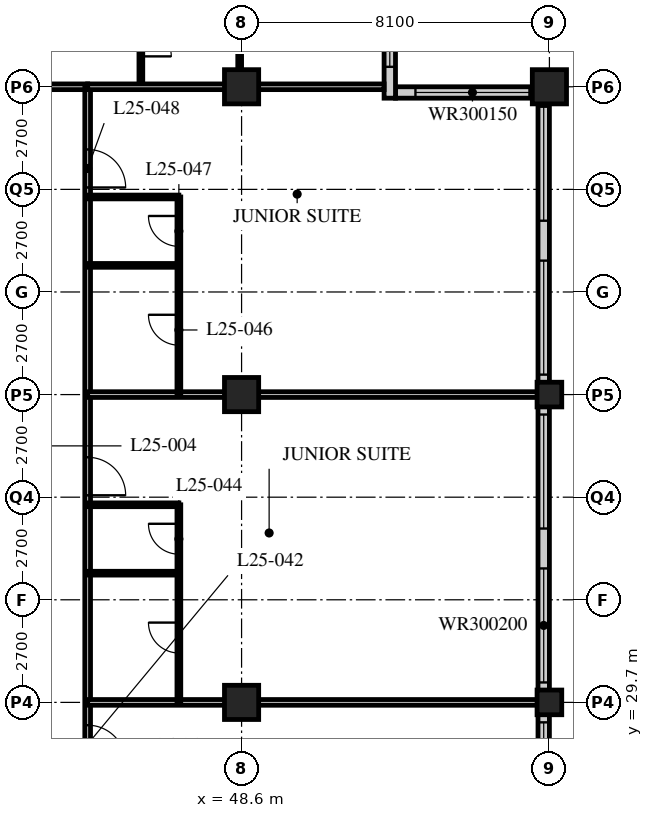
"""IFC4 building model, lengths in metres.
Left out: names, types, materials, properties, quantities, classifications, styles, units other than length and angle.
Written with IfcOpenShell. Run it as: python <this file> out.ifc"""

import sys

from ifc_helpers import new_model, si_unit, direction, frame, frame_2d, origin, origin_2d, place, context, subcontext, project, spatial, rectangle, hollow_rectangle, extrude, element, fill, save


model = new_model("IFC4")
c1 = context("Model", 3, precision=1e-05, world=origin(), true_north=direction((0.0, 1.0)))
c2 = subcontext(c1, "Body", "Model", "MODEL_VIEW")
j1 = project(units=[si_unit("LENGTHUNIT", "METRE"), si_unit("PLANEANGLEUNIT", "RADIAN")], contexts=[c1])
p1 = place(None, origin())
s1 = spatial("IfcSite", under=j1, at=p1, CompositionType="ELEMENT")
p2 = place(p1, origin())
s2 = spatial("IfcBuilding", under=s1, at=p2, CompositionType="ELEMENT")
p3 = place(p2, frame((0.0, 0.0, 103.4)))
s3 = spatial("IfcBuildingStorey", under=s2, at=p3, CompositionType="ELEMENT", Elevation=103.4)
for number, where, z_axis, x_axis in (
    (1, (48.6, 29.7, 0.0), (0.0, 0.0, 1.0), (1.0, 0.0, 0.0)),
    (2, (48.6, 37.8, 0.0), (0.0, 0.0, 1.0), (1.0, 0.0, 0.0)),
    (3, (48.6, 45.9, 0.0), (0.0, 0.0, 1.0), (1.0, 0.0, 0.0)),
):
    element("IfcColumn", number, at=place(p3, frame(where, z_axis=z_axis, x_axis=x_axis)), inside=s3, PredefinedType="COLUMN", context=c2, shape_type="SweptSolid", body=[
        extrude(hollow_rectangle(XDim=0.9, YDim=0.9, WallThickness=0.1, at=origin_2d()), origin(), (0.0, 0.0, 1.0), 3.4),
    ])
for number, where, z_axis, x_axis in (
    (4, (56.7, 29.7, 0.0), (0.0, 0.0, 1.0), (1.0, 0.0, 0.0)),
    (5, (56.7, 37.8, 0.0), (0.0, 0.0, 1.0), (1.0, 0.0, 0.0)),
):
    element("IfcColumn", number, at=place(p3, frame(where, z_axis=z_axis, x_axis=x_axis)), inside=s3, PredefinedType="COLUMN", context=c2, shape_type="SweptSolid", body=[
        extrude(hollow_rectangle(XDim=0.65, YDim=0.65, WallThickness=0.055, at=origin_2d()), origin(), (0.0, 0.0, 1.0), 3.4),
    ])
p4 = place(p3, frame((56.7, 45.9, 0.0), z_axis=(0.0, 0.0, 1.0), x_axis=(1.0, 0.0, 0.0)))
e6 = element("IfcColumn", 6, at=p4, inside=s3, PredefinedType="COLUMN", context=c2, shape_type="SweptSolid", body=[
    extrude(hollow_rectangle(XDim=0.9, YDim=0.9, WallThickness=0.09, at=origin_2d()), origin(), (0.0, 0.0, 1.0), 3.4),
])
p5 = place(p3, frame((56.55, 13.8, 0.0), z_axis=(0.0, 0.0, 1.0), x_axis=(0.0, 1.0, 0.0)))
e7 = element("IfcWall", 7, at=p5, inside=s3, PredefinedType="SOLIDWALL", context=c2, shape_type="SweptSolid", body=[
    extrude(rectangle(XDim=32.1, YDim=0.3, at=frame_2d((16.05, 0.0))), origin(), (0.0, 0.0, 1.0), 3.19),
])
p6 = place(p5, frame((0.225, 0.0, 0.9)))
e8 = element("IfcOpeningElement", 8, at=p6, cuts=e7, PredefinedType="OPENING", context=c2, shape_type="SweptSolid", body=[
    extrude(rectangle(XDim=3.0, YDim=2.0, at=frame_2d((1.5, 1.0))), frame((0.0, 0.16, 0.0), z_axis=(0.0, -1.0, 0.0), x_axis=(1.0, 0.0, 0.0)), (0.0, 0.0, 1.0), 0.32),
])
p7 = place(p5, frame((4.275, 0.0, 0.9)))
e9 = element("IfcOpeningElement", 9, at=p7, cuts=e7, PredefinedType="OPENING", context=c2, shape_type="SweptSolid", body=[
    extrude(rectangle(XDim=3.0, YDim=2.0, at=frame_2d((1.5, 1.0))), frame((0.0, 0.16, 0.0), z_axis=(0.0, -1.0, 0.0), x_axis=(1.0, 0.0, 0.0)), (0.0, 0.0, 1.0), 0.32),
])
p8 = place(p5, frame((8.325, 0.0, 0.9)))
e10 = element("IfcOpeningElement", 10, at=p8, cuts=e7, PredefinedType="OPENING", context=c2, shape_type="SweptSolid", body=[
    extrude(rectangle(XDim=3.0, YDim=2.0, at=frame_2d((1.5, 1.0))), frame((0.0, 0.16, 0.0), z_axis=(0.0, -1.0, 0.0), x_axis=(1.0, 0.0, 0.0)), (0.0, 0.0, 1.0), 0.32),
])
p9 = place(p5, frame((12.375, 0.0, 0.9)))
e11 = element("IfcOpeningElement", 11, at=p9, cuts=e7, PredefinedType="OPENING", context=c2, shape_type="SweptSolid", body=[
    extrude(rectangle(XDim=3.0, YDim=2.0, at=frame_2d((1.5, 1.0))), frame((0.0, 0.16, 0.0), z_axis=(0.0, -1.0, 0.0), x_axis=(1.0, 0.0, 0.0)), (0.0, 0.0, 1.0), 0.32),
])
p10 = place(p5, frame((16.425, 0.0, 0.9)))
e12 = element("IfcOpeningElement", 12, at=p10, cuts=e7, PredefinedType="OPENING", context=c2, shape_type="SweptSolid", body=[
    extrude(rectangle(XDim=3.0, YDim=2.0, at=frame_2d((1.5, 1.0))), frame((0.0, 0.16, 0.0), z_axis=(0.0, -1.0, 0.0), x_axis=(1.0, 0.0, 0.0)), (0.0, 0.0, 1.0), 0.32),
])
p11 = place(p5, frame((20.475, 0.0, 0.9)))
e13 = element("IfcOpeningElement", 13, at=p11, cuts=e7, PredefinedType="OPENING", context=c2, shape_type="SweptSolid", body=[
    extrude(rectangle(XDim=3.0, YDim=2.0, at=frame_2d((1.5, 1.0))), frame((0.0, 0.16, 0.0), z_axis=(0.0, -1.0, 0.0), x_axis=(1.0, 0.0, 0.0)), (0.0, 0.0, 1.0), 0.32),
])
p12 = place(p5, frame((24.525, 0.0, 0.9)))
e14 = element("IfcOpeningElement", 14, at=p12, cuts=e7, PredefinedType="OPENING", context=c2, shape_type="SweptSolid", body=[
    extrude(rectangle(XDim=3.0, YDim=2.0, at=frame_2d((1.5, 1.0))), frame((0.0, 0.16, 0.0), z_axis=(0.0, -1.0, 0.0), x_axis=(1.0, 0.0, 0.0)), (0.0, 0.0, 1.0), 0.32),
])
p13 = place(p5, frame((28.575, 0.0, 0.9)))
e15 = element("IfcOpeningElement", 15, at=p13, cuts=e7, PredefinedType="OPENING", context=c2, shape_type="SweptSolid", body=[
    extrude(rectangle(XDim=3.0, YDim=2.0, at=frame_2d((1.5, 1.0))), frame((0.0, 0.16, 0.0), z_axis=(0.0, -1.0, 0.0), x_axis=(1.0, 0.0, 0.0)), (0.0, 0.0, 1.0), 0.32),
])
p14 = place(p3, frame((56.4, 45.75, 0.0), z_axis=(0.0, 0.0, 1.0), x_axis=(-1.0, 0.0, 0.0)))
e16 = element("IfcWall", 16, at=p14, inside=s3, PredefinedType="SOLIDWALL", context=c2, shape_type="SweptSolid", body=[
    extrude(rectangle(XDim=3.75, YDim=0.3, at=frame_2d((1.875, 0.0))), origin(), (0.0, 0.0, 1.0), 3.19),
])
p15 = place(p14, frame((0.225, 0.0, 0.9)))
e17 = element("IfcOpeningElement", 17, at=p15, cuts=e16, PredefinedType="OPENING", context=c2, shape_type="SweptSolid", body=[
    extrude(rectangle(XDim=3.0, YDim=1.5, at=frame_2d((1.5, 0.75))), frame((0.0, 0.16, 0.0), z_axis=(0.0, -1.0, 0.0), x_axis=(1.0, 0.0, 0.0)), (0.0, 0.0, 1.0), 0.32),
])
p16 = place(p3, frame((52.5, 45.6, 0.0), z_axis=(0.0, 0.0, 1.0), x_axis=(0.0, 1.0, 0.0)))
e18 = element("IfcWall", 18, at=p16, inside=s3, PredefinedType="SOLIDWALL", context=c2, shape_type="SweptSolid", body=[
    extrude(rectangle(XDim=4.35, YDim=0.3, at=frame_2d((2.175, 0.0))), origin(), (0.0, 0.0, 1.0), 3.19),
])
p17 = place(p16, frame((0.825, 0.0, 0.9)))
e19 = element("IfcOpeningElement", 19, at=p17, cuts=e18, PredefinedType="OPENING", context=c2, shape_type="SweptSolid", body=[
    extrude(rectangle(XDim=3.0, YDim=1.5, at=frame_2d((1.5, 0.75))), frame((0.0, 0.16, 0.0), z_axis=(0.0, -1.0, 0.0), x_axis=(1.0, 0.0, 0.0)), (0.0, 0.0, 1.0), 0.32),
])
p18 = place(p3, frame((12.15, 45.9, 0.0), z_axis=(0.0, 0.0, 1.0), x_axis=(1.0, 0.0, 0.0)))
e20 = element("IfcWall", 20, at=p18, inside=s3, PredefinedType="PARTITIONING", context=c2, shape_type="SweptSolid", body=[
    extrude(rectangle(XDim=32.4, YDim=0.15, at=frame_2d((16.2, 0.0))), origin(), (0.0, 0.0, 1.0), 2.578),
])
p19 = place(p18, frame((9.5, 0.0, 0.0)))
e21 = element("IfcOpeningElement", 21, at=p19, cuts=e20, PredefinedType="OPENING", context=c2, shape_type="SweptSolid", body=[
    extrude(rectangle(XDim=1.0, YDim=2.1, at=frame_2d((0.5, 1.05))), frame((0.0, 0.085, 0.0), z_axis=(0.0, -1.0, 0.0), x_axis=(1.0, 0.0, 0.0)), (0.0, 0.0, 1.0), 0.17),
])
p20 = place(p18, frame((17.6, 0.0, 0.0)))
e22 = element("IfcOpeningElement", 22, at=p20, cuts=e20, PredefinedType="OPENING", context=c2, shape_type="SweptSolid", body=[
    extrude(rectangle(XDim=1.0, YDim=2.1, at=frame_2d((0.5, 1.05))), frame((0.0, 0.085, 0.0), z_axis=(0.0, -1.0, 0.0), x_axis=(1.0, 0.0, 0.0)), (0.0, 0.0, 1.0), 0.17),
])
p21 = place(p18, frame((25.7, 0.0, 0.0)))
e23 = element("IfcOpeningElement", 23, at=p21, cuts=e20, PredefinedType="OPENING", context=c2, shape_type="SweptSolid", body=[
    extrude(rectangle(XDim=1.0, YDim=2.1, at=frame_2d((0.5, 1.05))), frame((0.0, 0.085, 0.0), z_axis=(0.0, -1.0, 0.0), x_axis=(1.0, 0.0, 0.0)), (0.0, 0.0, 1.0), 0.17),
])
p22 = place(p18, frame((29.875, 0.0, 0.0)))
e24 = element("IfcOpeningElement", 24, at=p22, cuts=e20, PredefinedType="OPENING", context=c2, shape_type="SweptSolid", body=[
    extrude(rectangle(XDim=1.0, YDim=2.1, at=frame_2d((0.5, 1.05))), frame((0.0, 0.085, 0.0), z_axis=(0.0, -1.0, 0.0), x_axis=(1.0, 0.0, 0.0)), (0.0, 0.0, 1.0), 0.17),
])
p23 = place(p18, frame((1.525, 0.0, 0.0)))
e25 = element("IfcOpeningElement", 25, at=p23, cuts=e20, PredefinedType="OPENING", context=c2, shape_type="SweptSolid", body=[
    extrude(rectangle(XDim=1.0, YDim=2.1, at=frame_2d((0.5, 1.05))), frame((0.0, 0.085, 0.0), z_axis=(0.0, -1.0, 0.0), x_axis=(1.0, 0.0, 0.0)), (0.0, 0.0, 1.0), 0.17),
])
p24 = place(p3, frame((44.55, 21.6, 0.0), z_axis=(0.0, 0.0, 1.0), x_axis=(0.0, 1.0, 0.0)))
e26 = element("IfcWall", 26, at=p24, inside=s3, PredefinedType="PARTITIONING", context=c2, shape_type="SweptSolid", body=[
    extrude(rectangle(XDim=24.3, YDim=0.15, at=frame_2d((12.15, 0.0))), origin(), (0.0, 0.0, 1.0), 3.19),
])
p25 = place(p24, frame((2.75, 0.0, 0.0)))
e27 = element("IfcOpeningElement", 27, at=p25, cuts=e26, PredefinedType="OPENING", context=c2, shape_type="SweptSolid", body=[
    extrude(rectangle(XDim=1.0, YDim=2.1, at=frame_2d((0.5, 1.05))), frame((0.0, 0.085, 0.0), z_axis=(0.0, -1.0, 0.0), x_axis=(1.0, 0.0, 0.0)), (0.0, 0.0, 1.0), 0.17),
])
p26 = place(p24, frame((6.5, 0.0, 0.0)))
e28 = element("IfcOpeningElement", 28, at=p26, cuts=e26, PredefinedType="OPENING", context=c2, shape_type="SweptSolid", body=[
    extrude(rectangle(XDim=1.0, YDim=2.1, at=frame_2d((0.5, 1.05))), frame((0.0, 0.085, 0.0), z_axis=(0.0, -1.0, 0.0), x_axis=(1.0, 0.0, 0.0)), (0.0, 0.0, 1.0), 0.17),
])
p27 = place(p24, frame((13.55, 0.0, 0.0)))
e29 = element("IfcOpeningElement", 29, at=p27, cuts=e26, PredefinedType="OPENING", context=c2, shape_type="SweptSolid", body=[
    extrude(rectangle(XDim=1.0, YDim=2.1, at=frame_2d((0.5, 1.05))), frame((0.0, 0.085, 0.0), z_axis=(0.0, -1.0, 0.0), x_axis=(1.0, 0.0, 0.0)), (0.0, 0.0, 1.0), 0.17),
])
p28 = place(p24, frame((21.65, 0.0, 0.0)))
e30 = element("IfcOpeningElement", 30, at=p28, cuts=e26, PredefinedType="OPENING", context=c2, shape_type="SweptSolid", body=[
    extrude(rectangle(XDim=1.0, YDim=2.1, at=frame_2d((0.5, 1.05))), frame((0.0, 0.085, 0.0), z_axis=(0.0, -1.0, 0.0), x_axis=(1.0, 0.0, 0.0)), (0.0, 0.0, 1.0), 0.17),
])
p29 = place(p3, frame((44.55, 29.7, 0.0), z_axis=(0.0, 0.0, 1.0), x_axis=(1.0, 0.0, 0.0)))
e31 = element("IfcWall", 31, at=p29, inside=s3, PredefinedType="PARTITIONING", context=c2, shape_type="SweptSolid", body=[
    extrude(rectangle(XDim=11.85, YDim=0.15, at=frame_2d((5.925, 0.0))), origin(), (0.0, 0.0, 1.0), 2.578),
])
p30 = place(p3, frame((46.95, 29.7, 0.0), z_axis=(0.0, 0.0, 1.0), x_axis=(0.0, 1.0, 0.0)))
e32 = element("IfcWall", 32, at=p30, inside=s3, PredefinedType="PARTITIONING", context=c2, shape_type="SweptSolid", body=[
    extrude(rectangle(XDim=5.2, YDim=0.1, at=frame_2d((2.6, 0.0))), origin(), (0.0, 0.0, 1.0), 3.19),
])
p31 = place(p30, frame((1.3, 0.0, 0.0)))
e33 = element("IfcOpeningElement", 33, at=p31, cuts=e32, PredefinedType="OPENING", context=c2, shape_type="SweptSolid", body=[
    extrude(rectangle(XDim=0.8, YDim=2.1, at=frame_2d((0.4, 1.05))), frame((0.0, 0.06, 0.0), z_axis=(0.0, -1.0, 0.0), x_axis=(1.0, 0.0, 0.0)), (0.0, 0.0, 1.0), 0.12),
])
p32 = place(p30, frame((3.9, 0.0, 0.0)))
e34 = element("IfcOpeningElement", 34, at=p32, cuts=e32, PredefinedType="OPENING", context=c2, shape_type="SweptSolid", body=[
    extrude(rectangle(XDim=0.8, YDim=2.1, at=frame_2d((0.4, 1.05))), frame((0.0, 0.06, 0.0), z_axis=(0.0, -1.0, 0.0), x_axis=(1.0, 0.0, 0.0)), (0.0, 0.0, 1.0), 0.12),
])
for number, where, z_axis, x_axis in (
    (35, (44.55, 33.1, 0.0), (0.0, 0.0, 1.0), (1.0, 0.0, 0.0)),
    (36, (44.55, 34.9, 0.0), (0.0, 0.0, 1.0), (1.0, 0.0, 0.0)),
):
    element("IfcWall", number, at=place(p3, frame(where, z_axis=z_axis, x_axis=x_axis)), inside=s3, PredefinedType="PARTITIONING", context=c2, shape_type="SweptSolid", body=[
        extrude(rectangle(XDim=2.4, YDim=0.1, at=frame_2d((1.2, 0.0))), origin(), (0.0, 0.0, 1.0), 3.19),
    ])
p33 = place(p3, frame((44.55, 37.8, 0.0), z_axis=(0.0, 0.0, 1.0), x_axis=(1.0, 0.0, 0.0)))
e37 = element("IfcWall", 37, at=p33, inside=s3, PredefinedType="PARTITIONING", context=c2, shape_type="SweptSolid", body=[
    extrude(rectangle(XDim=11.85, YDim=0.15, at=frame_2d((5.925, 0.0))), origin(), (0.0, 0.0, 1.0), 2.578),
])
p34 = place(p3, frame((46.95, 37.8, 0.0), z_axis=(0.0, 0.0, 1.0), x_axis=(0.0, 1.0, 0.0)))
e38 = element("IfcWall", 38, at=p34, inside=s3, PredefinedType="PARTITIONING", context=c2, shape_type="SweptSolid", body=[
    extrude(rectangle(XDim=5.2, YDim=0.1, at=frame_2d((2.6, 0.0))), origin(), (0.0, 0.0, 1.0), 3.19),
])
p35 = place(p34, frame((1.3, 0.0, 0.0)))
e39 = element("IfcOpeningElement", 39, at=p35, cuts=e38, PredefinedType="OPENING", context=c2, shape_type="SweptSolid", body=[
    extrude(rectangle(XDim=0.8, YDim=2.1, at=frame_2d((0.4, 1.05))), frame((0.0, 0.06, 0.0), z_axis=(0.0, -1.0, 0.0), x_axis=(1.0, 0.0, 0.0)), (0.0, 0.0, 1.0), 0.12),
])
p36 = place(p34, frame((3.9, 0.0, 0.0)))
e40 = element("IfcOpeningElement", 40, at=p36, cuts=e38, PredefinedType="OPENING", context=c2, shape_type="SweptSolid", body=[
    extrude(rectangle(XDim=0.8, YDim=2.1, at=frame_2d((0.4, 1.05))), frame((0.0, 0.06, 0.0), z_axis=(0.0, -1.0, 0.0), x_axis=(1.0, 0.0, 0.0)), (0.0, 0.0, 1.0), 0.12),
])
for number, where, z_axis, x_axis in (
    (41, (44.55, 41.2, 0.0), (0.0, 0.0, 1.0), (1.0, 0.0, 0.0)),
    (42, (44.55, 43.0, 0.0), (0.0, 0.0, 1.0), (1.0, 0.0, 0.0)),
):
    element("IfcWall", number, at=place(p3, frame(where, z_axis=z_axis, x_axis=x_axis)), inside=s3, PredefinedType="PARTITIONING", context=c2, shape_type="SweptSolid", body=[
        extrude(rectangle(XDim=2.4, YDim=0.1, at=frame_2d((1.2, 0.0))), origin(), (0.0, 0.0, 1.0), 3.19),
    ])
p37 = place(p3, frame((45.95, 45.9, 0.0), z_axis=(0.0, 0.0, 1.0), x_axis=(0.0, 1.0, 0.0)))
e43 = element("IfcWall", 43, at=p37, inside=s3, PredefinedType="PARTITIONING", context=c2, shape_type="SweptSolid", body=[
    extrude(rectangle(XDim=2.4, YDim=0.1, at=frame_2d((1.2, 0.0))), origin(), (0.0, 0.0, 1.0), 3.19),
])
p38 = place(p37, frame((0.8, 0.0, 0.0)))
e44 = element("IfcOpeningElement", 44, at=p38, cuts=e43, PredefinedType="OPENING", context=c2, shape_type="SweptSolid", body=[
    extrude(rectangle(XDim=0.8, YDim=2.1, at=frame_2d((0.4, 1.05))), frame((0.0, 0.06, 0.0), z_axis=(0.0, -1.0, 0.0), x_axis=(1.0, 0.0, 0.0)), (0.0, 0.0, 1.0), 0.12),
])
p39 = place(p3, frame((48.55, 45.9, 0.0), z_axis=(0.0, 0.0, 1.0), x_axis=(0.0, 1.0, 0.0)))
e45 = element("IfcWall", 45, at=p39, inside=s3, PredefinedType="PARTITIONING", context=c2, shape_type="SweptSolid", body=[
    extrude(rectangle(XDim=2.4, YDim=0.1, at=frame_2d((1.2, 0.0))), origin(), (0.0, 0.0, 1.0), 2.64),
])
p40 = place(p3, frame((44.55, 45.9, 0.0), z_axis=(0.0, 0.0, 1.0), x_axis=(1.0, 0.0, 0.0)))
e46 = element("IfcWall", 46, at=p40, inside=s3, PredefinedType="PARTITIONING", context=c2, shape_type="SweptSolid", body=[
    extrude(rectangle(XDim=7.8, YDim=0.15, at=frame_2d((3.9, 0.0))), origin(), (0.0, 0.0, 1.0), 2.578),
])
p41 = place(p9, origin())
e47 = element("IfcWindow", 47, at=p41, inside=s3, PartitioningType="SINGLE_PANEL", PredefinedType="WINDOW", context=c2, shape_type="SweptSolid", body=[
    extrude(rectangle(XDim=3.0, YDim=2.0, at=frame_2d((1.5, 1.0))), frame((0.0, 0.03, 0.0), z_axis=(0.0, -1.0, 0.0), x_axis=(1.0, 0.0, 0.0)), (0.0, 0.0, 1.0), 0.06),
])
fill(e11, e47)
p42 = place(p10, origin())
e48 = element("IfcWindow", 48, at=p42, inside=s3, PartitioningType="SINGLE_PANEL", PredefinedType="WINDOW", context=c2, shape_type="SweptSolid", body=[
    extrude(rectangle(XDim=3.0, YDim=2.0, at=frame_2d((1.5, 1.0))), frame((0.0, 0.03, 0.0), z_axis=(0.0, -1.0, 0.0), x_axis=(1.0, 0.0, 0.0)), (0.0, 0.0, 1.0), 0.06),
])
fill(e12, e48)
p43 = place(p11, origin())
e49 = element("IfcWindow", 49, at=p43, inside=s3, PartitioningType="SINGLE_PANEL", PredefinedType="WINDOW", context=c2, shape_type="SweptSolid", body=[
    extrude(rectangle(XDim=3.0, YDim=2.0, at=frame_2d((1.5, 1.0))), frame((0.0, 0.03, 0.0), z_axis=(0.0, -1.0, 0.0), x_axis=(1.0, 0.0, 0.0)), (0.0, 0.0, 1.0), 0.06),
])
fill(e13, e49)
p44 = place(p12, origin())
e50 = element("IfcWindow", 50, at=p44, inside=s3, PartitioningType="SINGLE_PANEL", PredefinedType="WINDOW", context=c2, shape_type="SweptSolid", body=[
    extrude(rectangle(XDim=3.0, YDim=2.0, at=frame_2d((1.5, 1.0))), frame((0.0, 0.03, 0.0), z_axis=(0.0, -1.0, 0.0), x_axis=(1.0, 0.0, 0.0)), (0.0, 0.0, 1.0), 0.06),
])
fill(e14, e50)
p45 = place(p13, origin())
e51 = element("IfcWindow", 51, at=p45, inside=s3, PartitioningType="SINGLE_PANEL", PredefinedType="WINDOW", context=c2, shape_type="SweptSolid", body=[
    extrude(rectangle(XDim=3.0, YDim=2.0, at=frame_2d((1.5, 1.0))), frame((0.0, 0.03, 0.0), z_axis=(0.0, -1.0, 0.0), x_axis=(1.0, 0.0, 0.0)), (0.0, 0.0, 1.0), 0.06),
])
fill(e15, e51)
p46 = place(p15, origin())
e52 = element("IfcWindow", 52, at=p46, inside=s3, PartitioningType="SINGLE_PANEL", PredefinedType="WINDOW", context=c2, shape_type="SweptSolid", body=[
    extrude(rectangle(XDim=3.0, YDim=1.5, at=frame_2d((1.5, 0.75))), frame((0.0, 0.03, 0.0), z_axis=(0.0, -1.0, 0.0), x_axis=(1.0, 0.0, 0.0)), (0.0, 0.0, 1.0), 0.06),
])
fill(e17, e52)
p47 = place(p17, origin())
e53 = element("IfcWindow", 53, at=p47, inside=s3, PartitioningType="SINGLE_PANEL", PredefinedType="WINDOW", context=c2, shape_type="SweptSolid", body=[
    extrude(rectangle(XDim=3.0, YDim=1.5, at=frame_2d((1.5, 0.75))), frame((0.0, 0.03, 0.0), z_axis=(0.0, -1.0, 0.0), x_axis=(1.0, 0.0, 0.0)), (0.0, 0.0, 1.0), 0.06),
])
fill(e19, e53)
p48 = place(p26, origin())
e54 = element("IfcDoor", 54, at=p48, inside=s3, OperationType="SINGLE_SWING_RIGHT", PredefinedType="DOOR", context=c2, shape_type="SweptSolid", body=[
    extrude(rectangle(XDim=1.0, YDim=2.1, at=frame_2d((0.5, 1.05))), frame((0.0, 0.025, 0.0), z_axis=(0.0, -1.0, 0.0), x_axis=(1.0, 0.0, 0.0)), (0.0, 0.0, 1.0), 0.05),
])
fill(e28, e54)
p49 = place(p31, origin())
e55 = element("IfcDoor", 55, at=p49, inside=s3, OperationType="SINGLE_SWING_RIGHT", PredefinedType="DOOR", context=c2, shape_type="SweptSolid", body=[
    extrude(rectangle(XDim=0.8, YDim=2.1, at=frame_2d((0.4, 1.05))), frame((0.0, 0.025, 0.0), z_axis=(0.0, -1.0, 0.0), x_axis=(1.0, 0.0, 0.0)), (0.0, 0.0, 1.0), 0.05),
])
fill(e33, e55)
p50 = place(p32, origin())
e56 = element("IfcDoor", 56, at=p50, inside=s3, OperationType="SINGLE_SWING_RIGHT", PredefinedType="DOOR", context=c2, shape_type="SweptSolid", body=[
    extrude(rectangle(XDim=0.8, YDim=2.1, at=frame_2d((0.4, 1.05))), frame((0.0, 0.025, 0.0), z_axis=(0.0, -1.0, 0.0), x_axis=(1.0, 0.0, 0.0)), (0.0, 0.0, 1.0), 0.05),
])
fill(e34, e56)
p51 = place(p27, origin())
e57 = element("IfcDoor", 57, at=p51, inside=s3, OperationType="SINGLE_SWING_RIGHT", PredefinedType="DOOR", context=c2, shape_type="SweptSolid", body=[
    extrude(rectangle(XDim=1.0, YDim=2.1, at=frame_2d((0.5, 1.05))), frame((0.0, 0.025, 0.0), z_axis=(0.0, -1.0, 0.0), x_axis=(1.0, 0.0, 0.0)), (0.0, 0.0, 1.0), 0.05),
])
fill(e29, e57)
p52 = place(p35, origin())
e58 = element("IfcDoor", 58, at=p52, inside=s3, OperationType="SINGLE_SWING_RIGHT", PredefinedType="DOOR", context=c2, shape_type="SweptSolid", body=[
    extrude(rectangle(XDim=0.8, YDim=2.1, at=frame_2d((0.4, 1.05))), frame((0.0, 0.025, 0.0), z_axis=(0.0, -1.0, 0.0), x_axis=(1.0, 0.0, 0.0)), (0.0, 0.0, 1.0), 0.05),
])
fill(e39, e58)
p53 = place(p36, origin())
e59 = element("IfcDoor", 59, at=p53, inside=s3, OperationType="SINGLE_SWING_RIGHT", PredefinedType="DOOR", context=c2, shape_type="SweptSolid", body=[
    extrude(rectangle(XDim=0.8, YDim=2.1, at=frame_2d((0.4, 1.05))), frame((0.0, 0.025, 0.0), z_axis=(0.0, -1.0, 0.0), x_axis=(1.0, 0.0, 0.0)), (0.0, 0.0, 1.0), 0.05),
])
fill(e40, e59)
p54 = place(p28, origin())
e60 = element("IfcDoor", 60, at=p54, inside=s3, OperationType="SINGLE_SWING_RIGHT", PredefinedType="DOOR", context=c2, shape_type="SweptSolid", body=[
    extrude(rectangle(XDim=1.0, YDim=2.1, at=frame_2d((0.5, 1.05))), frame((0.0, 0.025, 0.0), z_axis=(0.0, -1.0, 0.0), x_axis=(1.0, 0.0, 0.0)), (0.0, 0.0, 1.0), 0.05),
])
fill(e30, e60)
p55 = place(p38, origin())
e61 = element("IfcDoor", 61, at=p55, inside=s3, OperationType="SINGLE_SWING_RIGHT", PredefinedType="DOOR", context=c2, shape_type="SweptSolid", body=[
    extrude(rectangle(XDim=0.8, YDim=2.1, at=frame_2d((0.4, 1.05))), frame((0.0, 0.025, 0.0), z_axis=(0.0, -1.0, 0.0), x_axis=(1.0, 0.0, 0.0)), (0.0, 0.0, 1.0), 0.05),
])
fill(e44, e61)
save(model, sys.argv[1])
